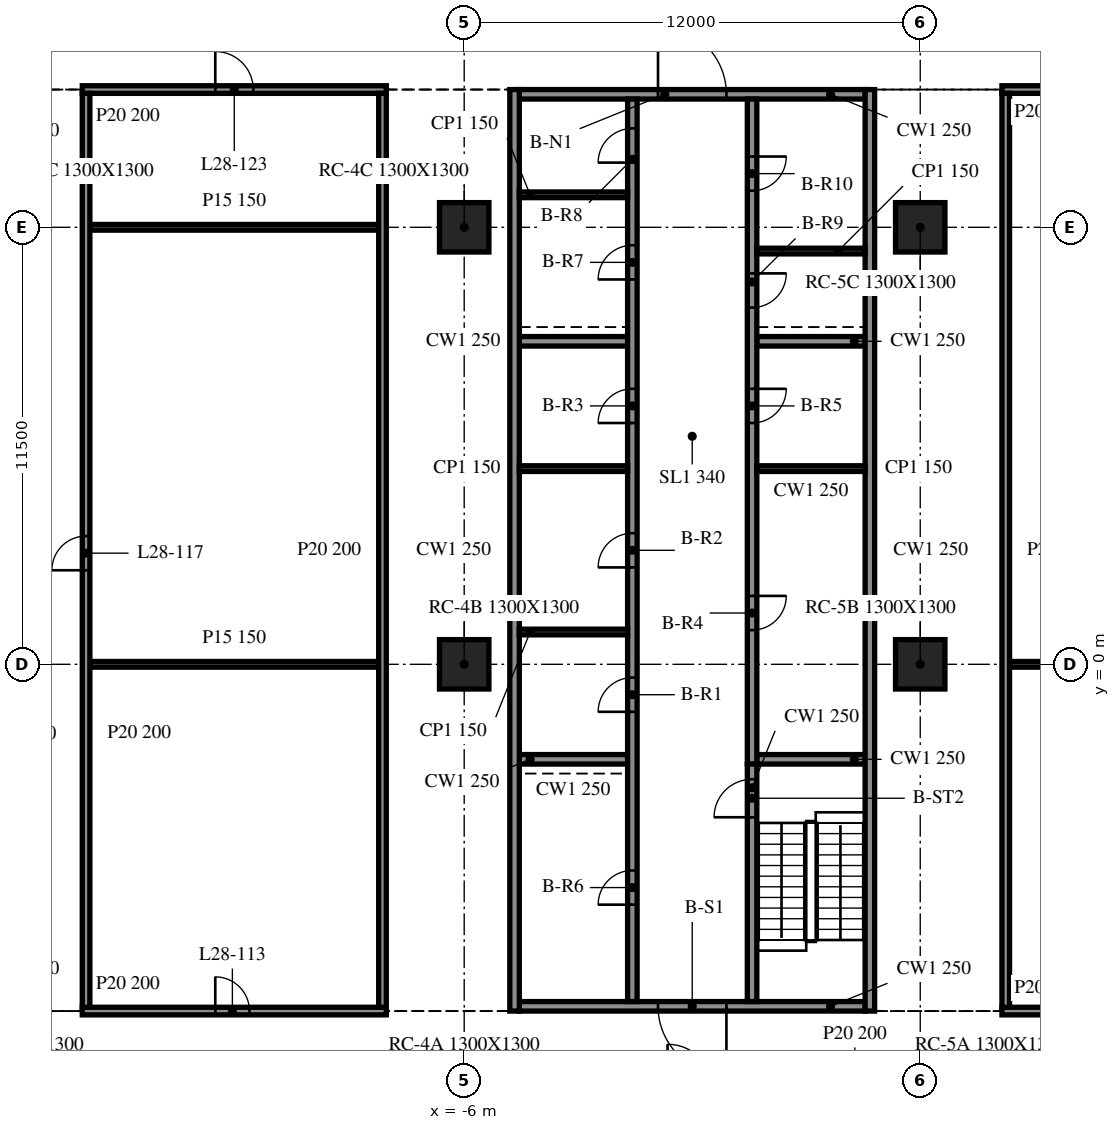
"""IFC4 building model, lengths in metres.
Left out: names, types, materials, properties, quantities, classifications, styles, units other than length and angle.
Written with IfcOpenShell. Run it as: python <this file> out.ifc"""

import sys

from ifc_helpers import new_model, si_unit, direction, frame, frame_2d, origin, origin_2d, place, context, subcontext, project, spatial, rectangle, extrude, element, fill, save


model = new_model("IFC4")
c1 = context("Model", 3, precision=1e-05, world=origin(), true_north=direction((0.0, 1.0)))
c2 = subcontext(c1, "Body", "Model", "MODEL_VIEW")
j1 = project(units=[si_unit("LENGTHUNIT", "METRE"), si_unit("PLANEANGLEUNIT", "RADIAN")], contexts=[c1])
p1 = place(None, origin())
s1 = spatial("IfcSite", under=j1, at=p1, CompositionType="ELEMENT")
p2 = place(p1, origin())
s2 = spatial("IfcBuilding", under=s1, at=p2, CompositionType="ELEMENT")
p3 = place(p2, frame((0.0, 0.0, 122.0)))
s3 = spatial("IfcBuildingStorey", under=s2, at=p3, CompositionType="ELEMENT", Elevation=122.0)
for number, where, z_axis, x_axis in (
    (1, (-6.0, 0.0, -0.34), (0.0, 0.0, 1.0), (1.0, 0.0, 0.0)),
    (2, (-6.0, 11.5, -0.34), (0.0, 0.0, 1.0), (1.0, 0.0, 0.0)),
    (3, (6.0, 0.0, -0.34), (0.0, 0.0, 1.0), (1.0, 0.0, 0.0)),
    (4, (6.0, 11.5, -0.34), (0.0, 0.0, 1.0), (1.0, 0.0, 0.0)),
):
    element("IfcColumn", number, at=place(p3, frame(where, z_axis=z_axis, x_axis=x_axis)), inside=s3, PredefinedType="COLUMN", context=c2, shape_type="SweptSolid", body=[
        extrude(rectangle(XDim=1.3, YDim=1.3, at=origin_2d()), origin(), (0.0, 0.0, 1.0), 4.1),
    ])
for number, where, z_axis, x_axis in (
    (5, (-4.675, 15.125, 0.0), (0.0, 0.0, 1.0), (0.0, -1.0, 0.0)),
    (6, (4.675, -9.125, 0.0), (0.0, 0.0, 1.0), (0.0, 1.0, 0.0)),
):
    element("IfcWall", number, at=place(p3, frame(where, z_axis=z_axis, x_axis=x_axis)), inside=s3, PredefinedType="SOLIDWALL", context=c2, shape_type="SweptSolid", body=[
        extrude(rectangle(XDim=24.25, YDim=0.25, at=frame_2d((12.125, 0.0))), origin(), (0.0, 0.0, 1.0), 3.76),
    ])
p4 = place(p3, frame((4.55, -9.0, 0.0), z_axis=(0.0, 0.0, 1.0), x_axis=(-1.0, 0.0, 0.0)))
e7 = element("IfcWall", 7, at=p4, inside=s3, PredefinedType="SOLIDWALL", context=c2, shape_type="SweptSolid", body=[
    extrude(rectangle(XDim=9.1, YDim=0.25, at=frame_2d((4.55, 0.0))), origin(), (0.0, 0.0, 1.0), 3.76),
])
p5 = place(p4, frame((3.65, 0.0, 0.0)))
e8 = element("IfcOpeningElement", 8, at=p5, cuts=e7, PredefinedType="OPENING", context=c2, shape_type="SweptSolid", body=[
    extrude(rectangle(XDim=1.8, YDim=2.1, at=frame_2d((0.9, 1.05))), frame((0.0, 0.135, 0.0), z_axis=(0.0, -1.0, 0.0), x_axis=(1.0, 0.0, 0.0)), (0.0, 0.0, 1.0), 0.27),
])
p6 = place(p3, frame((-4.55, 15.0, 0.0), z_axis=(0.0, 0.0, 1.0), x_axis=(1.0, 0.0, 0.0)))
e9 = element("IfcWall", 9, at=p6, inside=s3, PredefinedType="SOLIDWALL", context=c2, shape_type="SweptSolid", body=[
    extrude(rectangle(XDim=9.1, YDim=0.25, at=frame_2d((4.55, 0.0))), origin(), (0.0, 0.0, 1.0), 3.76),
])
p7 = place(p6, frame((3.65, 0.0, 0.0)))
e10 = element("IfcOpeningElement", 10, at=p7, cuts=e9, PredefinedType="OPENING", context=c2, shape_type="SweptSolid", body=[
    extrude(rectangle(XDim=1.8, YDim=2.1, at=frame_2d((0.9, 1.05))), frame((0.0, 0.135, 0.0), z_axis=(0.0, -1.0, 0.0), x_axis=(1.0, 0.0, 0.0)), (0.0, 0.0, 1.0), 0.27),
])
p8 = place(p3, frame((-1.575, -8.875, 0.0), z_axis=(0.0, 0.0, 1.0), x_axis=(0.0, 1.0, 0.0)))
e11 = element("IfcWall", 11, at=p8, inside=s3, PredefinedType="SOLIDWALL", context=c2, shape_type="SweptSolid", body=[
    extrude(rectangle(XDim=23.75, YDim=0.25, at=frame_2d((11.875, 0.0))), origin(), (0.0, 0.0, 1.0), 3.76),
])
p9 = place(p8, frame((7.625, 0.0, 0.0)))
e12 = element("IfcOpeningElement", 12, at=p9, cuts=e11, PredefinedType="OPENING", context=c2, shape_type="SweptSolid", body=[
    extrude(rectangle(XDim=0.9, YDim=2.1, at=frame_2d((0.45, 1.05))), frame((0.0, 0.135, 0.0), z_axis=(0.0, -1.0, 0.0), x_axis=(1.0, 0.0, 0.0)), (0.0, 0.0, 1.0), 0.27),
])
p10 = place(p8, frame((11.425, 0.0, 0.0)))
e13 = element("IfcOpeningElement", 13, at=p10, cuts=e11, PredefinedType="OPENING", context=c2, shape_type="SweptSolid", body=[
    extrude(rectangle(XDim=0.9, YDim=2.1, at=frame_2d((0.45, 1.05))), frame((0.0, 0.135, 0.0), z_axis=(0.0, -1.0, 0.0), x_axis=(1.0, 0.0, 0.0)), (0.0, 0.0, 1.0), 0.27),
])
p11 = place(p8, frame((15.225, 0.0, 0.0)))
e14 = element("IfcOpeningElement", 14, at=p11, cuts=e11, PredefinedType="OPENING", context=c2, shape_type="SweptSolid", body=[
    extrude(rectangle(XDim=0.9, YDim=2.1, at=frame_2d((0.45, 1.05))), frame((0.0, 0.135, 0.0), z_axis=(0.0, -1.0, 0.0), x_axis=(1.0, 0.0, 0.0)), (0.0, 0.0, 1.0), 0.27),
])
p12 = place(p8, frame((2.55, 0.0, 0.0)))
e15 = element("IfcOpeningElement", 15, at=p12, cuts=e11, PredefinedType="OPENING", context=c2, shape_type="SweptSolid", body=[
    extrude(rectangle(XDim=0.9, YDim=2.1, at=frame_2d((0.45, 1.05))), frame((0.0, 0.135, 0.0), z_axis=(0.0, -1.0, 0.0), x_axis=(1.0, 0.0, 0.0)), (0.0, 0.0, 1.0), 0.27),
])
p13 = place(p8, frame((19.002, 0.0, 0.0)))
e16 = element("IfcOpeningElement", 16, at=p13, cuts=e11, PredefinedType="OPENING", context=c2, shape_type="SweptSolid", body=[
    extrude(rectangle(XDim=0.9, YDim=2.1, at=frame_2d((0.45, 1.05))), frame((0.0, 0.135, 0.0), z_axis=(0.0, -1.0, 0.0), x_axis=(1.0, 0.0, 0.0)), (0.0, 0.0, 1.0), 0.27),
])
p14 = place(p8, frame((22.077, 0.0, 0.0)))
e17 = element("IfcOpeningElement", 17, at=p14, cuts=e11, PredefinedType="OPENING", context=c2, shape_type="SweptSolid", body=[
    extrude(rectangle(XDim=0.9, YDim=2.1, at=frame_2d((0.45, 1.05))), frame((0.0, 0.135, 0.0), z_axis=(0.0, -1.0, 0.0), x_axis=(1.0, 0.0, 0.0)), (0.0, 0.0, 1.0), 0.27),
])
p15 = place(p3, frame((1.575, -8.875, 0.0), z_axis=(0.0, 0.0, 1.0), x_axis=(0.0, 1.0, 0.0)))
e18 = element("IfcWall", 18, at=p15, inside=s3, PredefinedType="SOLIDWALL", context=c2, shape_type="SweptSolid", body=[
    extrude(rectangle(XDim=6.25, YDim=0.25, at=frame_2d((3.125, 0.0))), origin(), (0.0, 0.0, 1.0), 3.76),
])
p16 = place(p15, frame((4.85, 0.0, 0.0)))
e19 = element("IfcOpeningElement", 19, at=p16, cuts=e18, PredefinedType="OPENING", context=c2, shape_type="SweptSolid", body=[
    extrude(rectangle(XDim=1.0, YDim=2.1, at=frame_2d((0.5, 1.05))), frame((0.0, 0.135, 0.0), z_axis=(0.0, -1.0, 0.0), x_axis=(1.0, 0.0, 0.0)), (0.0, 0.0, 1.0), 0.27),
])
p17 = place(p3, frame((1.575, 14.875, 0.0), z_axis=(0.0, 0.0, 1.0), x_axis=(0.0, -1.0, 0.0)))
e20 = element("IfcWall", 20, at=p17, inside=s3, PredefinedType="SOLIDWALL", context=c2, shape_type="SweptSolid", body=[
    extrude(rectangle(XDim=17.5, YDim=0.25, at=frame_2d((8.75, 0.0))), origin(), (0.0, 0.0, 1.0), 3.76),
])
p18 = place(p17, frame((13.075, 0.0, 0.0)))
e21 = element("IfcOpeningElement", 21, at=p18, cuts=e20, PredefinedType="OPENING", context=c2, shape_type="SweptSolid", body=[
    extrude(rectangle(XDim=0.9, YDim=2.1, at=frame_2d((0.45, 1.05))), frame((0.0, 0.135, 0.0), z_axis=(0.0, -1.0, 0.0), x_axis=(1.0, 0.0, 0.0)), (0.0, 0.0, 1.0), 0.27),
])
p19 = place(p17, frame((7.625, 0.0, 0.0)))
e22 = element("IfcOpeningElement", 22, at=p19, cuts=e20, PredefinedType="OPENING", context=c2, shape_type="SweptSolid", body=[
    extrude(rectangle(XDim=0.9, YDim=2.1, at=frame_2d((0.45, 1.05))), frame((0.0, 0.135, 0.0), z_axis=(0.0, -1.0, 0.0), x_axis=(1.0, 0.0, 0.0)), (0.0, 0.0, 1.0), 0.27),
])
p20 = place(p17, frame((4.587, 0.0, 0.0)))
e23 = element("IfcOpeningElement", 23, at=p20, cuts=e20, PredefinedType="OPENING", context=c2, shape_type="SweptSolid", body=[
    extrude(rectangle(XDim=0.9, YDim=2.1, at=frame_2d((0.45, 1.05))), frame((0.0, 0.135, 0.0), z_axis=(0.0, -1.0, 0.0), x_axis=(1.0, 0.0, 0.0)), (0.0, 0.0, 1.0), 0.27),
])
p21 = place(p17, frame((1.512, 0.0, 0.0)))
e24 = element("IfcOpeningElement", 24, at=p21, cuts=e20, PredefinedType="OPENING", context=c2, shape_type="SweptSolid", body=[
    extrude(rectangle(XDim=0.9, YDim=2.1, at=frame_2d((0.45, 1.05))), frame((0.0, 0.135, 0.0), z_axis=(0.0, -1.0, 0.0), x_axis=(1.0, 0.0, 0.0)), (0.0, 0.0, 1.0), 0.27),
])
for number, where, z_axis, x_axis in (
    (25, (-4.55, -2.5, 0.0), (0.0, 0.0, 1.0), (1.0, 0.0, 0.0)),
    (26, (-4.55, 8.5, 0.0), (0.0, 0.0, 1.0), (1.0, 0.0, 0.0)),
    (27, (1.7, -2.5, 0.0), (0.0, 0.0, 1.0), (1.0, 0.0, 0.0)),
    (28, (1.7, 8.5, 0.0), (0.0, 0.0, 1.0), (1.0, 0.0, 0.0)),
):
    element("IfcWall", number, at=place(p3, frame(where, z_axis=z_axis, x_axis=x_axis)), inside=s3, PredefinedType="SOLIDWALL", context=c2, shape_type="SweptSolid", body=[
        extrude(rectangle(XDim=2.85, YDim=0.25, at=frame_2d((1.425, 0.0))), origin(), (0.0, 0.0, 1.0), 3.76),
    ])
for number, where, z_axis, x_axis in (
    (29, (-4.55, 0.85, 0.0), (0.0, 0.0, 1.0), (1.0, 0.0, 0.0)),
    (30, (-4.55, 5.15, 0.0), (0.0, 0.0, 1.0), (1.0, 0.0, 0.0)),
    (31, (1.7, 5.15, 0.0), (0.0, 0.0, 1.0), (1.0, 0.0, 0.0)),
    (32, (-4.55, 12.355, 0.0), (0.0, 0.0, 1.0), (1.0, 0.0, 0.0)),
    (33, (1.7, 10.875, 0.0), (0.0, 0.0, 1.0), (1.0, 0.0, 0.0)),
):
    element("IfcWall", number, at=place(p3, frame(where, z_axis=z_axis, x_axis=x_axis)), inside=s3, PredefinedType="PARTITIONING", context=c2, shape_type="SweptSolid", body=[
        extrude(rectangle(XDim=2.85, YDim=0.15, at=frame_2d((1.425, 0.0))), origin(), (0.0, 0.0, 1.0), 3.76),
    ])
p22 = place(p3, frame((-16.05, -9.125, 0.0), z_axis=(0.0, 0.0, 1.0), x_axis=(1.0, 0.0, 0.0)))
e34 = element("IfcWall", 34, at=p22, inside=s3, PredefinedType="PARTITIONING", context=c2, shape_type="SweptSolid", body=[
    extrude(rectangle(XDim=8.0, YDim=0.2, at=frame_2d((4.0, 0.0))), origin(), (0.0, 0.0, 1.0), 3.76),
])
p23 = place(p22, frame((3.5, 0.0, 0.0)))
e35 = element("IfcOpeningElement", 35, at=p23, cuts=e34, PredefinedType="OPENING", context=c2, shape_type="SweptSolid", body=[
    extrude(rectangle(XDim=0.9, YDim=2.1, at=frame_2d((0.45, 1.05))), frame((0.0, 0.11, 0.0), z_axis=(0.0, -1.0, 0.0), x_axis=(1.0, 0.0, 0.0)), (0.0, 0.0, 1.0), 0.22),
])
p24 = place(p3, frame((8.15, -9.125, 0.0), z_axis=(0.0, 0.0, 1.0), x_axis=(1.0, 0.0, 0.0)))
e36 = element("IfcWall", 36, at=p24, inside=s3, PredefinedType="PARTITIONING", context=c2, shape_type="SweptSolid", body=[
    extrude(rectangle(XDim=7.6, YDim=0.2, at=frame_2d((3.8, 0.0))), origin(), (0.0, 0.0, 1.0), 3.76),
])
p25 = place(p24, frame((3.3, 0.0, 0.0)))
e37 = element("IfcOpeningElement", 37, at=p25, cuts=e36, PredefinedType="OPENING", context=c2, shape_type="SweptSolid", body=[
    extrude(rectangle(XDim=0.9, YDim=2.1, at=frame_2d((0.45, 1.05))), frame((0.0, 0.11, 0.0), z_axis=(0.0, -1.0, 0.0), x_axis=(1.0, 0.0, 0.0)), (0.0, 0.0, 1.0), 0.22),
])
p26 = place(p3, frame((-15.85, 0.0, 0.0), z_axis=(0.0, 0.0, 1.0), x_axis=(1.0, 0.0, 0.0)))
e38 = element("IfcWall", 38, at=p26, inside=s3, PredefinedType="PARTITIONING", context=c2, shape_type="SweptSolid", body=[
    extrude(rectangle(XDim=7.6, YDim=0.15, at=frame_2d((3.8, 0.0))), origin(), (0.0, 0.0, 1.0), 3.76),
])
p27 = place(p3, frame((8.35, 0.0, 0.0), z_axis=(0.0, 0.0, 1.0), x_axis=(1.0, 0.0, 0.0)))
e39 = element("IfcWall", 39, at=p27, inside=s3, PredefinedType="PARTITIONING", context=c2, shape_type="SweptSolid", body=[
    extrude(rectangle(XDim=7.2, YDim=0.15, at=frame_2d((3.6, 0.0))), origin(), (0.0, 0.0, 1.0), 3.76),
])
p28 = place(p3, frame((-15.85, 11.5, 0.0), z_axis=(0.0, 0.0, 1.0), x_axis=(1.0, 0.0, 0.0)))
e40 = element("IfcWall", 40, at=p28, inside=s3, PredefinedType="PARTITIONING", context=c2, shape_type="SweptSolid", body=[
    extrude(rectangle(XDim=7.6, YDim=0.15, at=frame_2d((3.8, 0.0))), origin(), (0.0, 0.0, 1.0), 3.76),
])
p29 = place(p3, frame((-16.05, 15.125, 0.0), z_axis=(0.0, 0.0, 1.0), x_axis=(1.0, 0.0, 0.0)))
e41 = element("IfcWall", 41, at=p29, inside=s3, PredefinedType="PARTITIONING", context=c2, shape_type="SweptSolid", body=[
    extrude(rectangle(XDim=8.0, YDim=0.2, at=frame_2d((4.0, 0.0))), origin(), (0.0, 0.0, 1.0), 3.76),
])
p30 = place(p29, frame((3.5, 0.0, 0.0)))
e42 = element("IfcOpeningElement", 42, at=p30, cuts=e41, PredefinedType="OPENING", context=c2, shape_type="SweptSolid", body=[
    extrude(rectangle(XDim=1.0, YDim=2.1, at=frame_2d((0.5, 1.05))), frame((0.0, 0.11, 0.0), z_axis=(0.0, -1.0, 0.0), x_axis=(1.0, 0.0, 0.0)), (0.0, 0.0, 1.0), 0.22),
])
p31 = place(p3, frame((8.15, 15.125, 0.0), z_axis=(0.0, 0.0, 1.0), x_axis=(1.0, 0.0, 0.0)))
e43 = element("IfcWall", 43, at=p31, inside=s3, PredefinedType="PARTITIONING", context=c2, shape_type="SweptSolid", body=[
    extrude(rectangle(XDim=7.6, YDim=0.2, at=frame_2d((3.8, 0.0))), origin(), (0.0, 0.0, 1.0), 3.76),
])
p32 = place(p31, frame((3.3, 0.0, 0.0)))
e44 = element("IfcOpeningElement", 44, at=p32, cuts=e43, PredefinedType="OPENING", context=c2, shape_type="SweptSolid", body=[
    extrude(rectangle(XDim=0.9, YDim=2.1, at=frame_2d((0.45, 1.05))), frame((0.0, 0.11, 0.0), z_axis=(0.0, -1.0, 0.0), x_axis=(1.0, 0.0, 0.0)), (0.0, 0.0, 1.0), 0.22),
])
p33 = place(p3, frame((-15.95, -9.025, 0.0), z_axis=(0.0, 0.0, 1.0), x_axis=(0.0, 1.0, 0.0)))
e45 = element("IfcWall", 45, at=p33, inside=s3, PredefinedType="PARTITIONING", context=c2, shape_type="SweptSolid", body=[
    extrude(rectangle(XDim=24.05, YDim=0.2, at=frame_2d((12.025, 0.0))), origin(), (0.0, 0.0, 1.0), 3.76),
])
p34 = place(p33, frame((11.5, 0.0, 0.0)))
e46 = element("IfcOpeningElement", 46, at=p34, cuts=e45, PredefinedType="OPENING", context=c2, shape_type="SweptSolid", body=[
    extrude(rectangle(XDim=0.9, YDim=2.1, at=frame_2d((0.45, 1.05))), frame((0.0, 0.11, 0.0), z_axis=(0.0, -1.0, 0.0), x_axis=(1.0, 0.0, 0.0)), (0.0, 0.0, 1.0), 0.22),
])
for number, where, z_axis, x_axis in (
    (47, (-8.15, -9.025, 0.0), (0.0, 0.0, 1.0), (0.0, 1.0, 0.0)),
    (48, (8.25, -9.025, 0.0), (0.0, 0.0, 1.0), (0.0, 1.0, 0.0)),
):
    element("IfcWall", number, at=place(p3, frame(where, z_axis=z_axis, x_axis=x_axis)), inside=s3, PredefinedType="PARTITIONING", context=c2, shape_type="SweptSolid", body=[
        extrude(rectangle(XDim=24.05, YDim=0.2, at=frame_2d((12.025, 0.0))), origin(), (0.0, 0.0, 1.0), 3.76),
    ])
p35 = place(p5, origin())
e49 = element("IfcDoor", 49, at=p35, inside=s3, OperationType="DOUBLE_DOOR_SINGLE_SWING", PredefinedType="DOOR", context=c2, shape_type="SweptSolid", body=[
    extrude(rectangle(XDim=1.8, YDim=2.1, at=frame_2d((0.9, 1.05))), frame((0.0, 0.025, 0.0), z_axis=(0.0, -1.0, 0.0), x_axis=(1.0, 0.0, 0.0)), (0.0, 0.0, 1.0), 0.05),
])
fill(e8, e49)
p36 = place(p7, origin())
e50 = element("IfcDoor", 50, at=p36, inside=s3, OperationType="DOUBLE_DOOR_SINGLE_SWING", PredefinedType="DOOR", context=c2, shape_type="SweptSolid", body=[
    extrude(rectangle(XDim=1.8, YDim=2.1, at=frame_2d((0.9, 1.05))), frame((0.0, 0.025, 0.0), z_axis=(0.0, -1.0, 0.0), x_axis=(1.0, 0.0, 0.0)), (0.0, 0.0, 1.0), 0.05),
])
fill(e10, e50)
p37 = place(p9, origin())
e51 = element("IfcDoor", 51, at=p37, inside=s3, OperationType="SINGLE_SWING_LEFT", PredefinedType="DOOR", context=c2, shape_type="SweptSolid", body=[
    extrude(rectangle(XDim=0.9, YDim=2.1, at=frame_2d((0.45, 1.05))), frame((0.0, 0.025, 0.0), z_axis=(0.0, -1.0, 0.0), x_axis=(1.0, 0.0, 0.0)), (0.0, 0.0, 1.0), 0.05),
])
fill(e12, e51)
p38 = place(p10, origin())
e52 = element("IfcDoor", 52, at=p38, inside=s3, OperationType="SINGLE_SWING_RIGHT", PredefinedType="DOOR", context=c2, shape_type="SweptSolid", body=[
    extrude(rectangle(XDim=0.9, YDim=2.1, at=frame_2d((0.45, 1.05))), frame((0.0, 0.025, 0.0), z_axis=(0.0, -1.0, 0.0), x_axis=(1.0, 0.0, 0.0)), (0.0, 0.0, 1.0), 0.05),
])
fill(e13, e52)
p39 = place(p11, origin())
e53 = element("IfcDoor", 53, at=p39, inside=s3, OperationType="SINGLE_SWING_LEFT", PredefinedType="DOOR", context=c2, shape_type="SweptSolid", body=[
    extrude(rectangle(XDim=0.9, YDim=2.1, at=frame_2d((0.45, 1.05))), frame((0.0, 0.025, 0.0), z_axis=(0.0, -1.0, 0.0), x_axis=(1.0, 0.0, 0.0)), (0.0, 0.0, 1.0), 0.05),
])
fill(e14, e53)
p40 = place(p18, origin())
e54 = element("IfcDoor", 54, at=p40, inside=s3, OperationType="SINGLE_SWING_RIGHT", PredefinedType="DOOR", context=c2, shape_type="SweptSolid", body=[
    extrude(rectangle(XDim=0.9, YDim=2.1, at=frame_2d((0.45, 1.05))), frame((0.0, 0.025, 0.0), z_axis=(0.0, -1.0, 0.0), x_axis=(1.0, 0.0, 0.0)), (0.0, 0.0, 1.0), 0.05),
])
fill(e21, e54)
p41 = place(p19, origin())
e55 = element("IfcDoor", 55, at=p41, inside=s3, OperationType="SINGLE_SWING_LEFT", PredefinedType="DOOR", context=c2, shape_type="SweptSolid", body=[
    extrude(rectangle(XDim=0.9, YDim=2.1, at=frame_2d((0.45, 1.05))), frame((0.0, 0.025, 0.0), z_axis=(0.0, -1.0, 0.0), x_axis=(1.0, 0.0, 0.0)), (0.0, 0.0, 1.0), 0.05),
])
fill(e22, e55)
p42 = place(p12, origin())
e56 = element("IfcDoor", 56, at=p42, inside=s3, OperationType="SINGLE_SWING_RIGHT", PredefinedType="DOOR", context=c2, shape_type="SweptSolid", body=[
    extrude(rectangle(XDim=0.9, YDim=2.1, at=frame_2d((0.45, 1.05))), frame((0.0, 0.025, 0.0), z_axis=(0.0, -1.0, 0.0), x_axis=(1.0, 0.0, 0.0)), (0.0, 0.0, 1.0), 0.05),
])
fill(e15, e56)
p43 = place(p13, origin())
e57 = element("IfcDoor", 57, at=p43, inside=s3, OperationType="SINGLE_SWING_LEFT", PredefinedType="DOOR", context=c2, shape_type="SweptSolid", body=[
    extrude(rectangle(XDim=0.9, YDim=2.1, at=frame_2d((0.45, 1.05))), frame((0.0, 0.025, 0.0), z_axis=(0.0, -1.0, 0.0), x_axis=(1.0, 0.0, 0.0)), (0.0, 0.0, 1.0), 0.05),
])
fill(e16, e57)
p44 = place(p14, origin())
e58 = element("IfcDoor", 58, at=p44, inside=s3, OperationType="SINGLE_SWING_RIGHT", PredefinedType="DOOR", context=c2, shape_type="SweptSolid", body=[
    extrude(rectangle(XDim=0.9, YDim=2.1, at=frame_2d((0.45, 1.05))), frame((0.0, 0.025, 0.0), z_axis=(0.0, -1.0, 0.0), x_axis=(1.0, 0.0, 0.0)), (0.0, 0.0, 1.0), 0.05),
])
fill(e17, e58)
p45 = place(p20, origin())
e59 = element("IfcDoor", 59, at=p45, inside=s3, OperationType="SINGLE_SWING_LEFT", PredefinedType="DOOR", context=c2, shape_type="SweptSolid", body=[
    extrude(rectangle(XDim=0.9, YDim=2.1, at=frame_2d((0.45, 1.05))), frame((0.0, 0.025, 0.0), z_axis=(0.0, -1.0, 0.0), x_axis=(1.0, 0.0, 0.0)), (0.0, 0.0, 1.0), 0.05),
])
fill(e23, e59)
p46 = place(p21, origin())
e60 = element("IfcDoor", 60, at=p46, inside=s3, OperationType="SINGLE_SWING_RIGHT", PredefinedType="DOOR", context=c2, shape_type="SweptSolid", body=[
    extrude(rectangle(XDim=0.9, YDim=2.1, at=frame_2d((0.45, 1.05))), frame((0.0, 0.025, 0.0), z_axis=(0.0, -1.0, 0.0), x_axis=(1.0, 0.0, 0.0)), (0.0, 0.0, 1.0), 0.05),
])
fill(e24, e60)
p47 = place(p16, origin())
e61 = element("IfcDoor", 61, at=p47, inside=s3, OperationType="SINGLE_SWING_LEFT", PredefinedType="DOOR", context=c2, shape_type="SweptSolid", body=[
    extrude(rectangle(XDim=1.0, YDim=2.1, at=frame_2d((0.5, 1.05))), frame((0.0, 0.025, 0.0), z_axis=(0.0, -1.0, 0.0), x_axis=(1.0, 0.0, 0.0)), (0.0, 0.0, 1.0), 0.05),
])
fill(e19, e61)
p48 = place(p23, origin())
e62 = element("IfcDoor", 62, at=p48, inside=s3, OperationType="SINGLE_SWING_LEFT", PredefinedType="DOOR", context=c2, shape_type="SweptSolid", body=[
    extrude(rectangle(XDim=0.9, YDim=2.1, at=frame_2d((0.45, 1.05))), frame((0.0, 0.025, 0.0), z_axis=(0.0, -1.0, 0.0), x_axis=(1.0, 0.0, 0.0)), (0.0, 0.0, 1.0), 0.05),
])
fill(e35, e62)
p49 = place(p34, origin())
e63 = element("IfcDoor", 63, at=p49, inside=s3, OperationType="SINGLE_SWING_RIGHT", PredefinedType="DOOR", context=c2, shape_type="SweptSolid", body=[
    extrude(rectangle(XDim=0.9, YDim=2.1, at=frame_2d((0.45, 1.05))), frame((0.0, 0.025, 0.0), z_axis=(0.0, -1.0, 0.0), x_axis=(1.0, 0.0, 0.0)), (0.0, 0.0, 1.0), 0.05),
])
fill(e46, e63)
p50 = place(p30, origin())
e64 = element("IfcDoor", 64, at=p50, inside=s3, OperationType="SINGLE_SWING_RIGHT", PredefinedType="DOOR", context=c2, shape_type="SweptSolid", body=[
    extrude(rectangle(XDim=1.0, YDim=2.1, at=frame_2d((0.5, 1.05))), frame((0.0, 0.025, 0.0), z_axis=(0.0, -1.0, 0.0), x_axis=(1.0, 0.0, 0.0)), (0.0, 0.0, 1.0), 0.05),
])
fill(e42, e64)
save(model, sys.argv[1])
